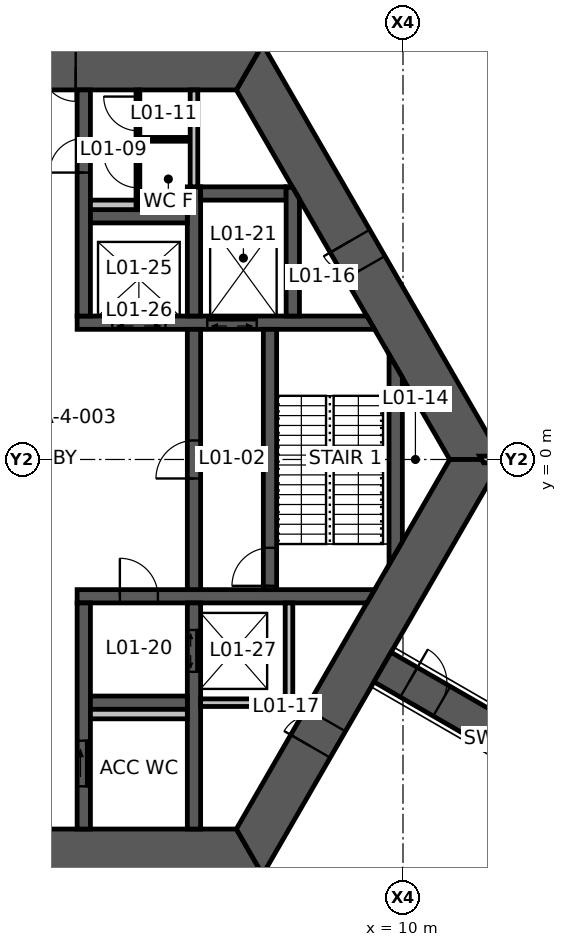
"""IFC4 building model, lengths in metres.
Left out: names, types, materials, properties, quantities, classifications, styles, units other than length and angle.
Written with IfcOpenShell. Run it as: python <this file> out.ifc"""

import sys

from ifc_helpers import new_model, si_unit, direction, frame, frame_2d, origin, place, context, subcontext, project, spatial, polyline, rectangle, outline, extrude, element, fill, save


model = new_model("IFC4")
c1 = context("Model", 3, precision=1e-05, world=origin(), true_north=direction((0.0, 1.0)))
c2 = subcontext(c1, "Body", "Model", "MODEL_VIEW")
j1 = project(units=[si_unit("LENGTHUNIT", "METRE"), si_unit("PLANEANGLEUNIT", "RADIAN")], contexts=[c1])
p1 = place(None, origin())
s1 = spatial("IfcSite", under=j1, at=p1, CompositionType="ELEMENT")
p2 = place(p1, origin())
s2 = spatial("IfcBuilding", under=s1, at=p2, CompositionType="ELEMENT")
p3 = place(p2, origin())
s3 = spatial("IfcBuildingStorey", under=s2, at=p3, CompositionType="ELEMENT", Elevation=0.0)
p4 = place(p3, frame((11.922, 0.0, 0.0), z_axis=(0.0, 0.0, 1.0), x_axis=(-0.500004296715, 0.866022923061, 0.0)))
e1 = element("IfcWall", 1, at=p4, inside=s3, PredefinedType="SHEAR", context=c2, shape_type="SweptSolid", body=[
    extrude(outline(polyline([(-0.346, -0.6), (5.835, -0.6), (6.635, -0.6), (12.269, -0.6), (11.576, 0.6), (6.635, 0.6), (5.835, 0.6), (0.346, 0.6), (-0.346, -0.6)])), origin(), (0.0, 0.0, 1.0), 5.5),
])
p5 = place(p4, frame((5.835, 0.0, 0.0)))
e2 = element("IfcOpeningElement", 2, at=p5, cuts=e1, PredefinedType="OPENING", context=c2, shape_type="SweptSolid", body=[
    extrude(rectangle(XDim=0.8, YDim=2.1, at=frame_2d((0.4, 1.05))), frame((0.0, 0.61, 0.0), z_axis=(0.0, -1.0, 0.0), x_axis=(1.0, 0.0, 0.0)), (0.0, 0.0, 1.0), 1.22),
])
p6 = place(p3, frame((5.961, 10.325, 0.0), z_axis=(0.0, 0.0, 1.0), x_axis=(-1.0, 0.0, 0.0)))
e3 = element("IfcWall", 3, at=p6, inside=s3, PredefinedType="SHEAR", context=c2, shape_type="SweptSolid", body=[
    extrude(outline(polyline([(-0.346, -0.6), (4.574, -0.6), (5.474, -0.6), (6.449, -0.6), (7.349, -0.6), (12.269, -0.6), (11.576, 0.6), (7.349, 0.6), (6.449, 0.6), (5.474, 0.6), (4.574, 0.6), (0.346, 0.6), (-0.346, -0.6)])), origin(), (0.0, 0.0, 1.0), 5.5),
])
p7 = place(p6, frame((6.449, 0.0, 0.0)))
e4 = element("IfcOpeningElement", 4, at=p7, cuts=e3, PredefinedType="OPENING", context=c2, shape_type="SweptSolid", body=[
    extrude(rectangle(XDim=0.9, YDim=2.1, at=frame_2d((0.45, 1.05))), frame((0.0, 0.61, 0.0), z_axis=(0.0, -1.0, 0.0), x_axis=(1.0, 0.0, 0.0)), (0.0, 0.0, 1.0), 1.22),
])
p8 = place(p6, frame((4.574, 0.0, 0.0)))
e5 = element("IfcOpeningElement", 5, at=p8, cuts=e3, PredefinedType="OPENING", context=c2, shape_type="SweptSolid", body=[
    extrude(rectangle(XDim=0.9, YDim=2.1, at=frame_2d((0.45, 1.05))), frame((0.0, 0.61, 0.0), z_axis=(0.0, -1.0, 0.0), x_axis=(1.0, 0.0, 0.0)), (0.0, 0.0, 1.0), 1.22),
])
p9 = place(p3, frame((-5.961, -10.325, 0.0), z_axis=(0.0, 0.0, 1.0), x_axis=(1.0, 0.0, 0.0)))
e6 = element("IfcWall", 6, at=p9, inside=s3, PredefinedType="SHEAR", context=c2, shape_type="SweptSolid", body=[
    extrude(outline(polyline([(-0.346, -0.6), (5.461, -0.6), (6.461, -0.6), (12.269, -0.6), (11.576, 0.6), (6.461, 0.6), (5.461, 0.6), (0.346, 0.6), (-0.346, -0.6)])), origin(), (0.0, 0.0, 1.0), 5.5),
])
p10 = place(p9, frame((5.461, 0.0, 0.0)))
e7 = element("IfcOpeningElement", 7, at=p10, cuts=e6, PredefinedType="OPENING", context=c2, shape_type="SweptSolid", body=[
    extrude(rectangle(XDim=1.0, YDim=2.1, at=frame_2d((0.5, 1.05))), frame((0.0, 0.61, 0.0), z_axis=(0.0, -1.0, 0.0), x_axis=(1.0, 0.0, 0.0)), (0.0, 0.0, 1.0), 1.22),
])
p11 = place(p3, frame((5.961, -10.325, 0.0), z_axis=(0.0, 0.0, 1.0), x_axis=(0.500004296715, 0.866022923061, 0.0)))
e8 = element("IfcWall", 8, at=p11, inside=s3, PredefinedType="SHEAR", context=c2, shape_type="SweptSolid", body=[
    extrude(outline(polyline([(-0.346, -0.6), (3.208, -0.6), (4.009, -0.6), (12.269, -0.6), (11.576, 0.6), (4.009, 0.6), (3.208, 0.6), (0.346, 0.6), (-0.346, -0.6)])), origin(), (0.0, 0.0, 1.0), 5.5),
])
p12 = place(p11, frame((3.208, 0.0, 0.0)))
e9 = element("IfcOpeningElement", 9, at=p12, cuts=e8, PredefinedType="OPENING", context=c2, shape_type="SweptSolid", body=[
    extrude(rectangle(XDim=0.8, YDim=2.1, at=frame_2d((0.4, 1.05))), frame((0.0, 0.61, 0.0), z_axis=(0.0, -1.0, 0.0), x_axis=(1.0, 0.0, 0.0)), (0.0, 0.0, 1.0), 1.22),
])
p13 = place(p3, frame((9.461, -5.462, 0.0), z_axis=(0.0, 0.0, 1.0), x_axis=(0.866019116917, -0.500010889016, 0.0)))
e10 = element("IfcWall", 10, at=p13, inside=s3, PredefinedType="SHEAR", context=c2, shape_type="SweptSolid", body=[
    extrude(rectangle(XDim=7.595, YDim=0.9, at=frame_2d((3.798, 0.0))), origin(), (0.0, 0.0, 1.0), 5.5),
])
p14 = place(p13, frame((0.8, 0.0, 0.0)))
e11 = element("IfcOpeningElement", 11, at=p14, cuts=e10, PredefinedType="OPENING", context=c2, shape_type="SweptSolid", body=[
    extrude(rectangle(XDim=1.0, YDim=2.1, at=frame_2d((0.5, 1.05))), frame((0.0, 0.46, 0.0), z_axis=(0.0, -1.0, 0.0), x_axis=(1.0, 0.0, 0.0)), (0.0, 0.0, 1.0), 0.92),
])
p15 = place(p3, frame((1.425, 3.6, 0.0), z_axis=(0.0, 0.0, 1.0), x_axis=(1.0, 0.0, 0.0)))
e12 = element("IfcWall", 12, at=p15, inside=s3, PredefinedType="SHEAR", context=c2, shape_type="SweptSolid", body=[
    extrude(outline(polyline([(0.0, -0.175), (0.925, -0.175), (2.325, -0.175), (3.425, -0.175), (4.725, -0.175), (7.827, -0.175), (7.625, 0.175), (4.725, 0.175), (3.425, 0.175), (2.325, 0.175), (0.925, 0.175), (0.0, 0.175), (0.0, -0.175)])), origin(), (0.0, 0.0, 1.0), 5.5),
])
p16 = place(p15, frame((0.925, 0.0, 0.0)))
e13 = element("IfcOpeningElement", 13, at=p16, cuts=e12, PredefinedType="OPENING", context=c2, shape_type="SweptSolid", body=[
    extrude(rectangle(XDim=1.4, YDim=2.1, at=frame_2d((0.7, 1.05))), frame((0.0, 0.185, 0.0), z_axis=(0.0, -1.0, 0.0), x_axis=(1.0, 0.0, 0.0)), (0.0, 0.0, 1.0), 0.37),
])
p17 = place(p15, frame((3.425, 0.0, 0.0)))
e14 = element("IfcOpeningElement", 14, at=p17, cuts=e12, PredefinedType="OPENING", context=c2, shape_type="SweptSolid", body=[
    extrude(rectangle(XDim=1.3, YDim=2.1, at=frame_2d((0.65, 1.05))), frame((0.0, 0.185, 0.0), z_axis=(0.0, -1.0, 0.0), x_axis=(1.0, 0.0, 0.0)), (0.0, 0.0, 1.0), 0.37),
])
p18 = place(p3, frame((1.425, -3.6, 0.0), z_axis=(0.0, 0.0, 1.0), x_axis=(1.0, 0.0, 0.0)))
e15 = element("IfcWall", 15, at=p18, inside=s3, PredefinedType="SHEAR", context=c2, shape_type="SweptSolid", body=[
    extrude(outline(polyline([(0.0, -0.175), (1.125, -0.175), (2.125, -0.175), (7.625, -0.175), (7.827, 0.175), (2.125, 0.175), (1.125, 0.175), (0.0, 0.175), (0.0, -0.175)])), origin(), (0.0, 0.0, 1.0), 5.5),
])
p19 = place(p18, frame((1.125, 0.0, 0.0)))
e16 = element("IfcOpeningElement", 16, at=p19, cuts=e15, PredefinedType="OPENING", context=c2, shape_type="SweptSolid", body=[
    extrude(rectangle(XDim=1.0, YDim=2.1, at=frame_2d((0.5, 1.05))), frame((0.0, 0.185, 0.0), z_axis=(0.0, -1.0, 0.0), x_axis=(1.0, 0.0, 0.0)), (0.0, 0.0, 1.0), 0.37),
])
p20 = place(p3, frame((1.6, 3.775, 0.0), z_axis=(0.0, 0.0, 1.0), x_axis=(0.0, 1.0, 0.0)))
e17 = element("IfcWall", 17, at=p20, inside=s3, PredefinedType="SHEAR", context=c2, shape_type="SweptSolid", body=[
    extrude(rectangle(XDim=5.95, YDim=0.35, at=frame_2d((2.975, 0.0))), origin(), (0.0, 0.0, 1.0), 5.5),
])
p21 = place(p20, frame((3.775, 0.0, 0.0)))
e18 = element("IfcOpeningElement", 18, at=p21, cuts=e17, PredefinedType="OPENING", context=c2, shape_type="SweptSolid", body=[
    extrude(rectangle(XDim=0.9, YDim=2.1, at=frame_2d((0.45, 1.05))), frame((0.0, 0.185, 0.0), z_axis=(0.0, -1.0, 0.0), x_axis=(1.0, 0.0, 0.0)), (0.0, 0.0, 1.0), 0.37),
])
p22 = place(p3, frame((1.6, -3.775, 0.0), z_axis=(0.0, 0.0, 1.0), x_axis=(0.0, -1.0, 0.0)))
e19 = element("IfcWall", 19, at=p22, inside=s3, PredefinedType="SHEAR", context=c2, shape_type="SweptSolid", body=[
    extrude(rectangle(XDim=5.95, YDim=0.35, at=frame_2d((2.975, 0.0))), origin(), (0.0, 0.0, 1.0), 5.5),
])
p23 = place(p22, frame((3.625, 0.0, 0.0)))
e20 = element("IfcOpeningElement", 20, at=p23, cuts=e19, PredefinedType="OPENING", context=c2, shape_type="SweptSolid", body=[
    extrude(rectangle(XDim=1.2, YDim=2.1, at=frame_2d((0.6, 1.05))), frame((0.0, 0.185, 0.0), z_axis=(0.0, -1.0, 0.0), x_axis=(1.0, 0.0, 0.0)), (0.0, 0.0, 1.0), 0.37),
])
p24 = place(p3, frame((4.5, -3.425, 0.0), z_axis=(0.0, 0.0, 1.0), x_axis=(0.0, 1.0, 0.0)))
e21 = element("IfcWall", 21, at=p24, inside=s3, PredefinedType="SHEAR", context=c2, shape_type="SweptSolid", body=[
    extrude(rectangle(XDim=6.85, YDim=0.35, at=frame_2d((3.425, 0.0))), origin(), (0.0, 0.0, 1.0), 5.5),
])
p25 = place(p24, frame((2.925, 0.0, 0.0)))
e22 = element("IfcOpeningElement", 22, at=p25, cuts=e21, PredefinedType="OPENING", context=c2, shape_type="SweptSolid", body=[
    extrude(rectangle(XDim=1.0, YDim=2.1, at=frame_2d((0.5, 1.05))), frame((0.0, 0.185, 0.0), z_axis=(0.0, -1.0, 0.0), x_axis=(1.0, 0.0, 0.0)), (0.0, 0.0, 1.0), 0.37),
])
p26 = place(p3, frame((6.5, -3.425, 0.0), z_axis=(0.0, 0.0, 1.0), x_axis=(0.0, 1.0, 0.0)))
e23 = element("IfcWall", 23, at=p26, inside=s3, PredefinedType="SHEAR", context=c2, shape_type="SweptSolid", body=[
    extrude(rectangle(XDim=6.85, YDim=0.35, at=frame_2d((3.425, 0.0))), origin(), (0.0, 0.0, 1.0), 5.5),
])
p27 = place(p26, frame((0.1, 0.0, 0.0)))
e24 = element("IfcOpeningElement", 24, at=p27, cuts=e23, PredefinedType="OPENING", context=c2, shape_type="SweptSolid", body=[
    extrude(rectangle(XDim=1.0, YDim=2.1, at=frame_2d((0.5, 1.05))), frame((0.0, 0.185, 0.0), z_axis=(0.0, -1.0, 0.0), x_axis=(1.0, 0.0, 0.0)), (0.0, 0.0, 1.0), 0.37),
])
p28 = place(p3, frame((4.5, 3.775, 0.0), z_axis=(0.0, 0.0, 1.0), x_axis=(0.0, 1.0, 0.0)))
e25 = element("IfcWall", 25, at=p28, inside=s3, PredefinedType="SHEAR", context=c2, shape_type="SweptSolid", body=[
    extrude(rectangle(XDim=3.4, YDim=0.35, at=frame_2d((1.7, 0.0))), origin(), (0.0, 0.0, 1.0), 5.5),
])
p29 = place(p3, frame((4.5, -3.775, 0.0), z_axis=(0.0, 0.0, 1.0), x_axis=(0.0, -1.0, 0.0)))
e26 = element("IfcWall", 26, at=p29, inside=s3, PredefinedType="SHEAR", context=c2, shape_type="SweptSolid", body=[
    extrude(rectangle(XDim=5.95, YDim=0.35, at=frame_2d((2.975, 0.0))), origin(), (0.0, 0.0, 1.0), 5.5),
])
p30 = place(p29, frame((0.712, 0.0, 0.0)))
e27 = element("IfcOpeningElement", 27, at=p30, cuts=e26, PredefinedType="OPENING", context=c2, shape_type="SweptSolid", body=[
    extrude(rectangle(XDim=1.1, YDim=2.1, at=frame_2d((0.55, 1.05))), frame((0.0, 0.185, 0.0), z_axis=(0.0, -1.0, 0.0), x_axis=(1.0, 0.0, 0.0)), (0.0, 0.0, 1.0), 0.37),
])
for number, where, z_axis, x_axis in (
    (28, (1.775, 6.4, 0.0), (0.0, 0.0, 1.0), (1.0, 0.0, 0.0)),
    (29, (1.775, -6.4, 0.0), (0.0, 0.0, 1.0), (1.0, 0.0, 0.0)),
):
    element("IfcWall", number, at=place(p3, frame(where, z_axis=z_axis, x_axis=x_axis)), inside=s3, PredefinedType="SHEAR", context=c2, shape_type="SweptSolid", body=[
        extrude(rectangle(XDim=2.55, YDim=0.35, at=frame_2d((1.275, 0.0))), origin(), (0.0, 0.0, 1.0), 5.5),
    ])
p31 = place(p3, frame((4.675, 7.0, 0.0), z_axis=(0.0, 0.0, 1.0), x_axis=(1.0, 0.0, 0.0)))
e30 = element("IfcWall", 30, at=p31, inside=s3, PredefinedType="SHEAR", context=c2, shape_type="SweptSolid", body=[
    extrude(rectangle(XDim=2.25, YDim=0.35, at=frame_2d((1.125, 0.0))), origin(), (0.0, 0.0, 1.0), 5.5),
])
p32 = place(p3, frame((7.1, 3.775, 0.0), z_axis=(0.0, 0.0, 1.0), x_axis=(0.0, 1.0, 0.0)))
e31 = element("IfcWall", 31, at=p32, inside=s3, PredefinedType="SHEAR", context=c2, shape_type="SweptSolid", body=[
    extrude(outline(polyline([(0.0, -0.175), (3.074, -0.175), (3.377, 0.0), (3.4, 0.175), (0.0, 0.175), (0.0, -0.175)])), origin(), (0.0, 0.0, 1.0), 5.5),
])
p33 = place(p3, frame((9.808, -2.462, 0.0), z_axis=(0.0, 0.0, 1.0), x_axis=(0.0, 1.0, 0.0)))
e32 = element("IfcWall", 32, at=p33, inside=s3, PredefinedType="SHEAR", context=c2, shape_type="SweptSolid", body=[
    extrude(outline(polyline([(0.303, -0.175), (4.621, -0.175), (5.228, 0.175), (-0.303, 0.175), (0.303, -0.175)])), origin(), (0.0, 0.0, 1.0), 5.5),
])
p34 = place(p3, frame((4.5, 7.175, 0.0), z_axis=(0.0, 0.0, 1.0), x_axis=(0.0, 1.0, 0.0)))
e33 = element("IfcWall", 33, at=p34, inside=s3, PredefinedType="STANDARD", context=c2, shape_type="SweptSolid", body=[
    extrude(rectangle(XDim=2.55, YDim=0.2, at=frame_2d((1.275, 0.0))), origin(), (0.0, 0.0, 1.0), 5.5),
])
p35 = place(p3, frame((4.675, -6.4, 0.0), z_axis=(0.0, 0.0, 1.0), x_axis=(1.0, 0.0, 0.0)))
e34 = element("IfcWall", 34, at=p35, inside=s3, PredefinedType="STANDARD", context=c2, shape_type="SweptSolid", body=[
    extrude(rectangle(XDim=2.425, YDim=0.2, at=frame_2d((1.212, 0.0))), origin(), (0.0, 0.0, 1.0), 5.5),
])
p36 = place(p3, frame((7.0, -3.775, 0.0), z_axis=(0.0, 0.0, 1.0), x_axis=(0.0, -1.0, 0.0)))
e35 = element("IfcWall", 35, at=p36, inside=s3, PredefinedType="STANDARD", context=c2, shape_type="SweptSolid", body=[
    extrude(rectangle(XDim=2.525, YDim=0.2, at=frame_2d((1.263, 0.0))), origin(), (0.0, 0.0, 1.0), 5.5),
])
for number, where, z_axis, x_axis in (
    (36, (1.775, 6.7, 0.0), (0.0, 0.0, 1.0), (1.0, 0.0, 0.0)),
    (37, (1.775, -6.7, 0.0), (0.0, 0.0, 1.0), (1.0, 0.0, 0.0)),
):
    element("IfcWall", number, at=place(p3, frame(where, z_axis=z_axis, x_axis=x_axis)), inside=s3, PredefinedType="PLUMBINGWALL", context=c2, shape_type="SweptSolid", body=[
        extrude(rectangle(XDim=2.55, YDim=0.25, at=frame_2d((1.275, 0.0))), origin(), (0.0, 0.0, 1.0), 5.5),
    ])
p37 = place(p3, frame((3.025, 6.575, 0.0), z_axis=(0.0, 0.0, 1.0), x_axis=(0.0, 1.0, 0.0)))
e38 = element("IfcWall", 38, at=p37, inside=s3, PredefinedType="PARTITIONING", context=c2, shape_type="SweptSolid", body=[
    extrude(rectangle(XDim=3.15, YDim=0.1, at=frame_2d((1.575, 0.0))), origin(), (0.0, 0.0, 1.0), 4.5),
])
p38 = place(p37, frame((0.575, 0.0, 0.0)))
e39 = element("IfcOpeningElement", 39, at=p38, cuts=e38, PredefinedType="OPENING", context=c2, shape_type="SweptSolid", body=[
    extrude(rectangle(XDim=0.9, YDim=2.1, at=frame_2d((0.45, 1.05))), frame((0.0, 0.06, 0.0), z_axis=(0.0, -1.0, 0.0), x_axis=(1.0, 0.0, 0.0)), (0.0, 0.0, 1.0), 0.12),
])
p39 = place(p37, frame((2.075, 0.0, 0.0)))
e40 = element("IfcOpeningElement", 40, at=p39, cuts=e38, PredefinedType="OPENING", context=c2, shape_type="SweptSolid", body=[
    extrude(rectangle(XDim=0.9, YDim=2.1, at=frame_2d((0.45, 1.05))), frame((0.0, 0.06, 0.0), z_axis=(0.0, -1.0, 0.0), x_axis=(1.0, 0.0, 0.0)), (0.0, 0.0, 1.0), 0.12),
])
p40 = place(p3, frame((3.075, 8.425, 0.0), z_axis=(0.0, 0.0, 1.0), x_axis=(1.0, 0.0, 0.0)))
e41 = element("IfcWall", 41, at=p40, inside=s3, PredefinedType="PARTITIONING", context=c2, shape_type="SweptSolid", body=[
    extrude(rectangle(XDim=1.25, YDim=0.1, at=frame_2d((0.625, 0.0))), origin(), (0.0, 0.0, 1.0), 4.5),
])
p41 = place(p3, frame((12.07, 0.0, 0.0), z_axis=(0.0, 0.0, 1.0), x_axis=(1.0, 0.0, 0.0)))
e42 = element("IfcWall", 42, at=p41, inside=s3, PredefinedType="PARTITIONING", context=c2, shape_type="SweptSolid", body=[
    extrude(outline(polyline([(0.051, -0.087), (1.129, -0.087), (2.129, -0.087), (7.93, -0.087), (7.93, 0.087), (2.129, 0.087), (1.129, 0.087), (-0.051, 0.087), (0.051, -0.087)])), origin(), (0.0, 0.0, 1.0), 4.6),
])
p42 = place(p41, frame((1.129, 0.0, 0.0)))
e43 = element("IfcOpeningElement", 43, at=p42, cuts=e42, PredefinedType="OPENING", context=c2, shape_type="SweptSolid", body=[
    extrude(rectangle(XDim=1.0, YDim=2.1, at=frame_2d((0.5, 1.05))), frame((0.0, 0.098, 0.0), z_axis=(0.0, -1.0, 0.0), x_axis=(1.0, 0.0, 0.0)), (0.0, 0.0, 1.0), 0.195),
])
p43 = place(p8, origin())
e44 = element("IfcDoor", 44, at=p43, inside=s3, OperationType="SINGLE_SWING_LEFT", PredefinedType="DOOR", context=c2, shape_type="SweptSolid", body=[
    extrude(rectangle(XDim=0.9, YDim=2.1, at=frame_2d((0.45, 1.05))), frame((0.0, 0.025, 0.0), z_axis=(0.0, -1.0, 0.0), x_axis=(1.0, 0.0, 0.0)), (0.0, 0.0, 1.0), 0.05),
])
fill(e5, e44)
p44 = place(p5, origin())
e45 = element("IfcDoor", 45, at=p44, inside=s3, OperationType="SINGLE_SWING_RIGHT", PredefinedType="DOOR", context=c2, shape_type="SweptSolid", body=[
    extrude(rectangle(XDim=0.8, YDim=2.1, at=frame_2d((0.4, 1.05))), frame((0.0, 0.025, 0.0), z_axis=(0.0, -1.0, 0.0), x_axis=(1.0, 0.0, 0.0)), (0.0, 0.0, 1.0), 0.05),
])
fill(e2, e45)
p45 = place(p12, origin())
e46 = element("IfcDoor", 46, at=p45, inside=s3, OperationType="SINGLE_SWING_LEFT", PredefinedType="DOOR", context=c2, shape_type="SweptSolid", body=[
    extrude(rectangle(XDim=0.8, YDim=2.1, at=frame_2d((0.4, 1.05))), frame((0.0, 0.025, 0.0), z_axis=(0.0, -1.0, 0.0), x_axis=(1.0, 0.0, 0.0)), (0.0, 0.0, 1.0), 0.05),
])
fill(e9, e46)
p46 = place(p25, origin())
e47 = element("IfcDoor", 47, at=p46, inside=s3, OperationType="SINGLE_SWING_LEFT", PredefinedType="DOOR", context=c2, shape_type="SweptSolid", body=[
    extrude(rectangle(XDim=1.0, YDim=2.1, at=frame_2d((0.5, 1.05))), frame((0.0, 0.025, 0.0), z_axis=(0.0, -1.0, 0.0), x_axis=(1.0, 0.0, 0.0)), (0.0, 0.0, 1.0), 0.05),
])
fill(e22, e47)
p47 = place(p27, origin())
e48 = element("IfcDoor", 48, at=p47, inside=s3, OperationType="SINGLE_SWING_LEFT", PredefinedType="DOOR", context=c2, shape_type="SweptSolid", body=[
    extrude(rectangle(XDim=1.0, YDim=2.1, at=frame_2d((0.5, 1.05))), frame((0.0, 0.025, 0.0), z_axis=(0.0, -1.0, 0.0), x_axis=(1.0, 0.0, 0.0)), (0.0, 0.0, 1.0), 0.05),
])
fill(e24, e48)
p48 = place(p21, origin())
e49 = element("IfcDoor", 49, at=p48, inside=s3, OperationType="SINGLE_SWING_LEFT", PredefinedType="DOOR", context=c2, shape_type="SweptSolid", body=[
    extrude(rectangle(XDim=0.9, YDim=2.1, at=frame_2d((0.45, 1.05))), frame((0.0, 0.025, 0.0), z_axis=(0.0, -1.0, 0.0), x_axis=(1.0, 0.0, 0.0)), (0.0, 0.0, 1.0), 0.05),
])
fill(e18, e49)
p49 = place(p23, origin())
e50 = element("IfcDoor", 50, at=p49, inside=s3, OperationType="SLIDING_TO_LEFT", PredefinedType="DOOR", context=c2, shape_type="SweptSolid", body=[
    extrude(rectangle(XDim=1.2, YDim=2.1, at=frame_2d((0.6, 1.05))), frame((0.0, 0.025, 0.0), z_axis=(0.0, -1.0, 0.0), x_axis=(1.0, 0.0, 0.0)), (0.0, 0.0, 1.0), 0.05),
])
fill(e20, e50)
p50 = place(p19, origin())
e51 = element("IfcDoor", 51, at=p50, inside=s3, OperationType="SINGLE_SWING_LEFT", PredefinedType="DOOR", context=c2, shape_type="SweptSolid", body=[
    extrude(rectangle(XDim=1.0, YDim=2.1, at=frame_2d((0.5, 1.05))), frame((0.0, 0.025, 0.0), z_axis=(0.0, -1.0, 0.0), x_axis=(1.0, 0.0, 0.0)), (0.0, 0.0, 1.0), 0.05),
])
fill(e16, e51)
p51 = place(p14, origin())
e52 = element("IfcDoor", 52, at=p51, inside=s3, OperationType="SINGLE_SWING_LEFT", PredefinedType="DOOR", context=c2, shape_type="SweptSolid", body=[
    extrude(rectangle(XDim=1.0, YDim=2.1, at=frame_2d((0.5, 1.05))), frame((0.0, 0.025, 0.0), z_axis=(0.0, -1.0, 0.0), x_axis=(1.0, 0.0, 0.0)), (0.0, 0.0, 1.0), 0.05),
])
fill(e11, e52)
p52 = place(p38, origin())
e53 = element("IfcDoor", 53, at=p52, inside=s3, OperationType="SINGLE_SWING_RIGHT", PredefinedType="DOOR", context=c2, shape_type="SweptSolid", body=[
    extrude(rectangle(XDim=0.9, YDim=2.1, at=frame_2d((0.45, 1.05))), frame((0.0, 0.025, 0.0), z_axis=(0.0, -1.0, 0.0), x_axis=(1.0, 0.0, 0.0)), (0.0, 0.0, 1.0), 0.05),
])
fill(e39, e53)
p53 = place(p39, origin())
e54 = element("IfcDoor", 54, at=p53, inside=s3, OperationType="SINGLE_SWING_RIGHT", PredefinedType="DOOR", context=c2, shape_type="SweptSolid", body=[
    extrude(rectangle(XDim=0.9, YDim=2.1, at=frame_2d((0.45, 1.05))), frame((0.0, 0.025, 0.0), z_axis=(0.0, -1.0, 0.0), x_axis=(1.0, 0.0, 0.0)), (0.0, 0.0, 1.0), 0.05),
])
fill(e40, e54)
p54 = place(p30, origin())
e55 = element("IfcDoor", 55, at=p54, inside=s3, OperationType="DOUBLE_DOOR_SLIDING", PredefinedType="DOOR", context=c2, shape_type="SweptSolid", body=[
    extrude(rectangle(XDim=1.1, YDim=2.1, at=frame_2d((0.55, 1.05))), frame((0.0, 0.025, 0.0), z_axis=(0.0, -1.0, 0.0), x_axis=(1.0, 0.0, 0.0)), (0.0, 0.0, 1.0), 0.05),
])
fill(e27, e55)
p55 = place(p16, origin())
e56 = element("IfcDoor", 56, at=p55, inside=s3, OperationType="DOUBLE_DOOR_SLIDING", PredefinedType="DOOR", context=c2, shape_type="SweptSolid", body=[
    extrude(rectangle(XDim=1.4, YDim=2.1, at=frame_2d((0.7, 1.05))), frame((0.0, 0.025, 0.0), z_axis=(0.0, -1.0, 0.0), x_axis=(1.0, 0.0, 0.0)), (0.0, 0.0, 1.0), 0.05),
])
fill(e13, e56)
p56 = place(p17, origin())
e57 = element("IfcDoor", 57, at=p56, inside=s3, OperationType="DOUBLE_DOOR_SLIDING", PredefinedType="DOOR", context=c2, shape_type="SweptSolid", body=[
    extrude(rectangle(XDim=1.3, YDim=2.1, at=frame_2d((0.65, 1.05))), frame((0.0, 0.025, 0.0), z_axis=(0.0, -1.0, 0.0), x_axis=(1.0, 0.0, 0.0)), (0.0, 0.0, 1.0), 0.05),
])
fill(e14, e57)
save(model, sys.argv[1])
